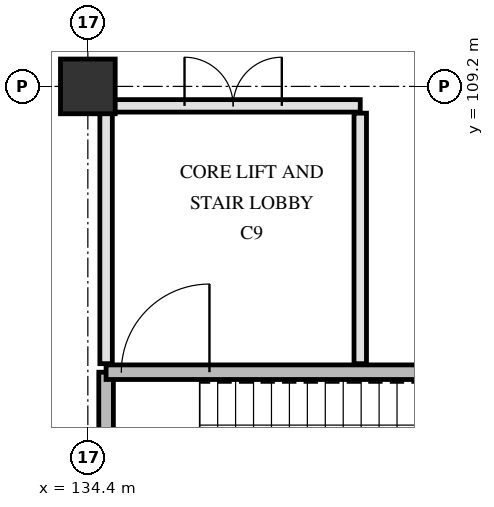
"""IFC4 building model, lengths in metres.
Left out: names, types, materials, properties, quantities, classifications, styles, units other than length and angle.
Written with IfcOpenShell. Run it as: python <this file> out.ifc"""

import sys

from ifc_helpers import new_model, si_unit, direction, frame, frame_2d, origin, origin_2d, place, context, subcontext, project, spatial, rectangle, extrude, element, fill, save


model = new_model("IFC4")
c1 = context("Model", 3, precision=1e-05, world=origin(), true_north=direction((0.0, 1.0)))
c2 = subcontext(c1, "Body", "Model", "MODEL_VIEW")
j1 = project(units=[si_unit("LENGTHUNIT", "METRE"), si_unit("PLANEANGLEUNIT", "RADIAN")], contexts=[c1])
p1 = place(None, origin())
s1 = spatial("IfcSite", under=j1, at=p1, CompositionType="ELEMENT")
p2 = place(p1, origin())
s2 = spatial("IfcBuilding", under=s1, at=p2, CompositionType="ELEMENT")
p3 = place(p2, frame((0.0, 0.0, -5.4)))
s3 = spatial("IfcBuildingStorey", under=s2, at=p3, CompositionType="ELEMENT", Elevation=-5.4)
p4 = place(p3, frame((134.4, 109.2, 0.0), z_axis=(0.0, 0.0, 1.0), x_axis=(1.0, 0.0, 0.0)))
e1 = element("IfcColumn", 1, at=p4, inside=s3, PredefinedType="COLUMN", context=c2, shape_type="SweptSolid", body=[
    extrude(rectangle(XDim=0.9, YDim=0.9, at=origin_2d()), origin(), (0.0, 0.0, 1.0), 5.4),
])
p5 = place(p3, frame((134.7, 101.18, 0.0), z_axis=(0.0, 0.0, 1.0), x_axis=(0.0, 1.0, 0.0)))
e2 = element("IfcWall", 2, at=p5, inside=s3, PredefinedType="SHEAR", context=c2, shape_type="SweptSolid", body=[
    extrude(rectangle(XDim=3.32, YDim=0.24, at=frame_2d((1.66, 0.0))), origin(), (0.0, 0.0, 1.0), 5.08),
])
p6 = place(p3, frame((134.7, 104.5, 0.0), z_axis=(0.0, 0.0, 1.0), x_axis=(1.0, 0.0, 0.0)))
e3 = element("IfcWall", 3, at=p6, inside=s3, PredefinedType="SHEAR", context=c2, shape_type="SweptSolid", body=[
    extrude(rectangle(XDim=7.82, YDim=0.24, at=frame_2d((3.91, 0.0))), origin(), (0.0, 0.0, 1.0), 5.08),
])
p7 = place(p6, frame((0.25, 0.0, 0.0)))
e4 = element("IfcOpeningElement", 4, at=p7, cuts=e3, PredefinedType="OPENING", context=c2, shape_type="SweptSolid", body=[
    extrude(rectangle(XDim=1.45, YDim=2.2, at=frame_2d((0.725, 1.1))), frame((0.0, 0.13, 0.0), z_axis=(0.0, -1.0, 0.0), x_axis=(1.0, 0.0, 0.0)), (0.0, 0.0, 1.0), 0.26),
])
p8 = place(p3, frame((138.88, 104.64, 0.0), z_axis=(0.0, 0.0, 1.0), x_axis=(0.0, 1.0, 0.0)))
e5 = element("IfcWall", 5, at=p8, inside=s3, PredefinedType="PARTITIONING", context=c2, shape_type="SweptSolid", body=[
    extrude(rectangle(XDim=4.12, YDim=0.205, at=frame_2d((2.06, 0.0))), origin(), (0.0, 0.0, 1.0), 5.07),
])
p9 = place(p3, frame((134.7, 104.64, 0.0), z_axis=(0.0, 0.0, 1.0), x_axis=(0.0, 1.0, 0.0)))
e6 = element("IfcWall", 6, at=p9, inside=s3, PredefinedType="PARTITIONING", context=c2, shape_type="SweptSolid", body=[
    extrude(rectangle(XDim=4.12, YDim=0.205, at=frame_2d((2.06, 0.0))), origin(), (0.0, 0.0, 1.0), 4.47),
])
p10 = place(p3, frame((134.7, 108.88, 0.0), z_axis=(0.0, 0.0, 1.0), x_axis=(1.0, 0.0, 0.0)))
e7 = element("IfcWall", 7, at=p10, inside=s3, PredefinedType="PARTITIONING", context=c2, shape_type="SweptSolid", body=[
    extrude(rectangle(XDim=4.18, YDim=0.205, at=frame_2d((2.09, 0.0))), origin(), (0.0, 0.0, 1.0), 4.42),
])
p11 = place(p10, frame((1.29, 0.0, 0.0)))
e8 = element("IfcOpeningElement", 8, at=p11, cuts=e7, PredefinedType="OPENING", context=c2, shape_type="SweptSolid", body=[
    extrude(rectangle(XDim=1.6, YDim=2.25, at=frame_2d((0.8, 1.125))), frame((0.0, 0.113, 0.0), z_axis=(0.0, -1.0, 0.0), x_axis=(1.0, 0.0, 0.0)), (0.0, 0.0, 1.0), 0.225),
])
p12 = place(p7, origin())
e9 = element("IfcDoor", 9, at=p12, inside=s3, OperationType="SINGLE_SWING_RIGHT", PredefinedType="DOOR", context=c2, shape_type="SweptSolid", body=[
    extrude(rectangle(XDim=1.45, YDim=2.2, at=frame_2d((0.725, 1.1))), frame((0.0, 0.025, 0.0), z_axis=(0.0, -1.0, 0.0), x_axis=(1.0, 0.0, 0.0)), (0.0, 0.0, 1.0), 0.05),
])
fill(e4, e9)
p13 = place(p11, origin())
e10 = element("IfcDoor", 10, at=p13, inside=s3, OperationType="DOUBLE_SWING_LEFT", PredefinedType="DOOR", context=c2, shape_type="SweptSolid", body=[
    extrude(rectangle(XDim=1.6, YDim=2.25, at=frame_2d((0.8, 1.125))), frame((0.0, 0.025, 0.0), z_axis=(0.0, -1.0, 0.0), x_axis=(1.0, 0.0, 0.0)), (0.0, 0.0, 1.0), 0.05),
])
fill(e8, e10)
save(model, sys.argv[1])
